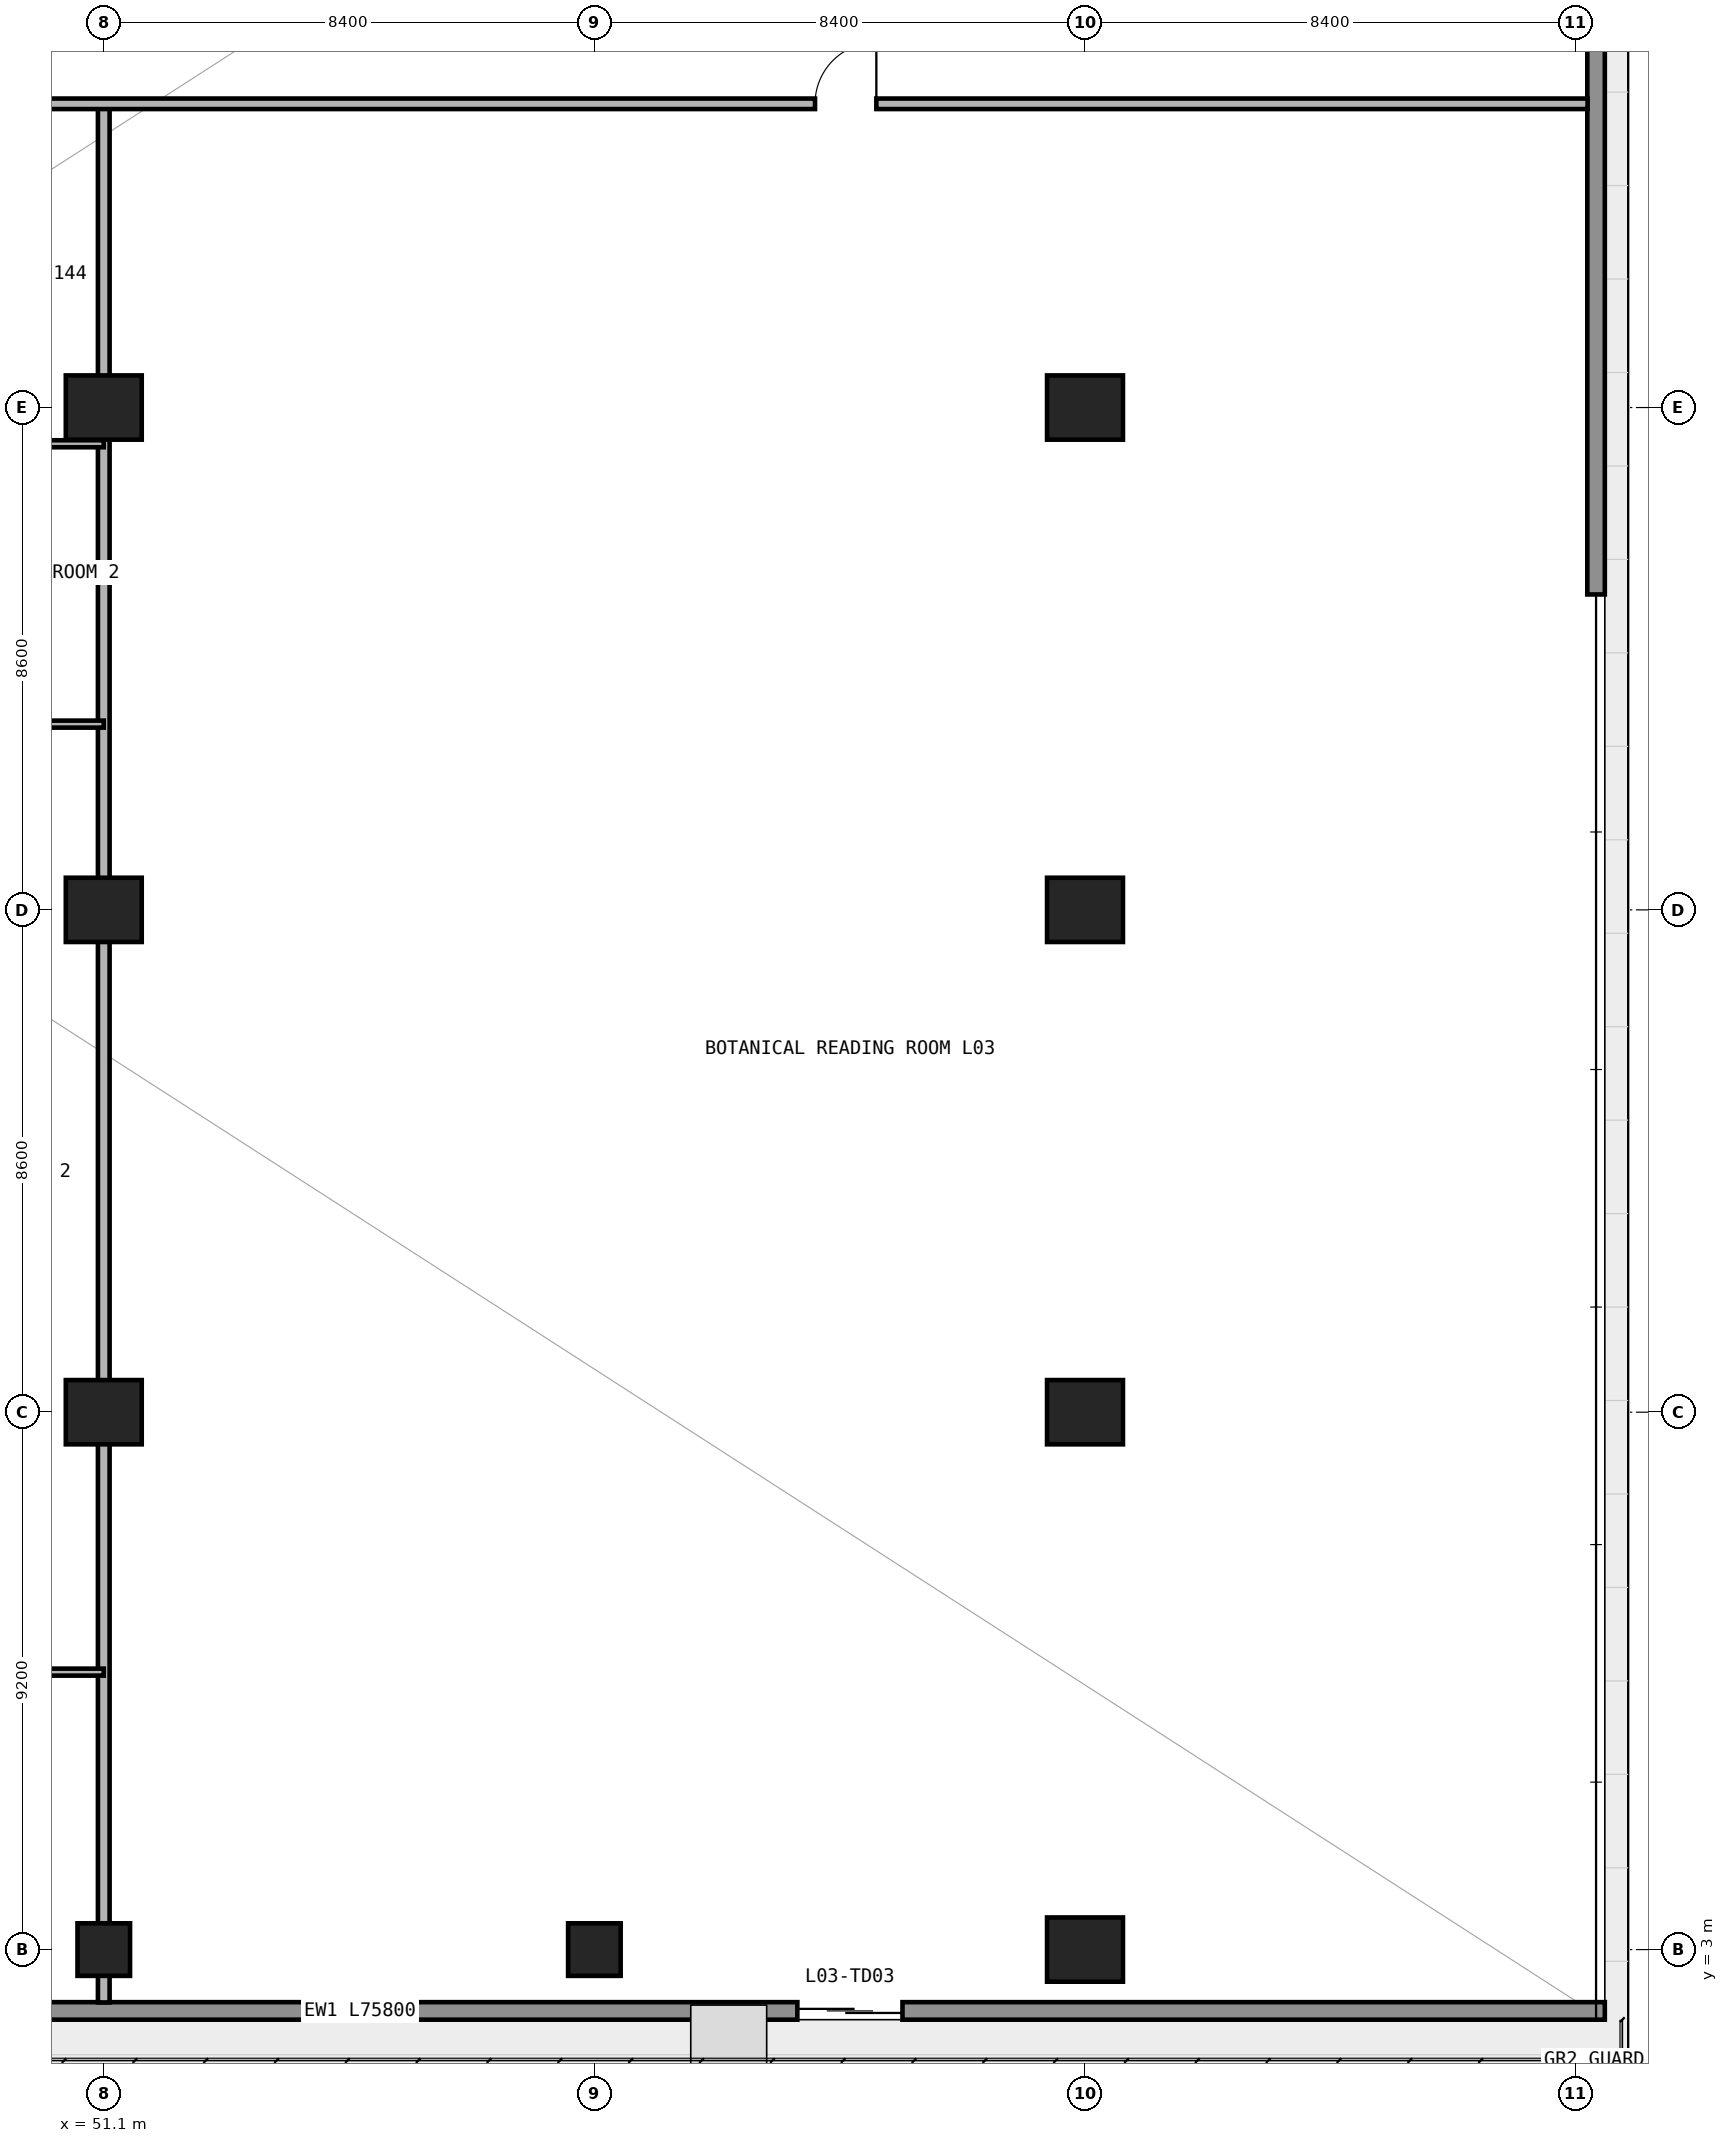
"""IFC4 building model, lengths in metres.
Left out: names, types, materials, properties, quantities, classifications, styles, units other than length and angle.
Written with IfcOpenShell. Run it as: python <this file> out.ifc"""

import sys

from ifc_helpers import new_model, si_unit, direction, frame, frame_2d, origin, origin_2d, place, context, subcontext, project, spatial, rectangle, circle, extrude, element, fill, save


model = new_model("IFC4")
c1 = context("Model", 3, precision=1e-05, world=origin(), true_north=direction((0.0, 1.0)))
c2 = subcontext(c1, "Body", "Model", "MODEL_VIEW")
j1 = project(units=[si_unit("LENGTHUNIT", "METRE"), si_unit("PLANEANGLEUNIT", "RADIAN")], contexts=[c1])
p1 = place(None, origin())
s1 = spatial("IfcSite", under=j1, at=p1, CompositionType="ELEMENT")
p2 = place(p1, origin())
s2 = spatial("IfcBuilding", under=s1, at=p2, CompositionType="ELEMENT")
p3 = place(p2, frame((0.0, 0.0, 15.0)))
s3 = spatial("IfcBuildingStorey", under=s2, at=p3, CompositionType="ELEMENT", Elevation=15.0)
for number, where, z_axis, x_axis in (
    (1, (51.1, 3.0, 0.0), (0.0, 0.0, 1.0), (1.0, 0.0, 0.0)),
    (2, (59.5, 3.0, 0.0), (0.0, 0.0, 1.0), (1.0, 0.0, 0.0)),
):
    element("IfcColumn", number, at=place(p3, frame(where, z_axis=z_axis, x_axis=x_axis)), inside=s3, PredefinedType="COLUMN", context=c2, shape_type="SweptSolid", body=[
        extrude(circle(Radius=0.45, at=origin_2d()), origin(), (0.0, 0.0, 1.0), 4.5),
    ])
for number, where, z_axis, x_axis in (
    (3, (67.9, 3.0, 0.0), (0.0, 0.0, 1.0), (1.0, 0.0, 0.0)),
    (4, (51.1, 12.2, 0.0), (0.0, 0.0, 1.0), (1.0, 0.0, 0.0)),
    (5, (67.9, 12.2, 0.0), (0.0, 0.0, 1.0), (1.0, 0.0, 0.0)),
    (6, (51.1, 20.8, 0.0), (0.0, 0.0, 1.0), (1.0, 0.0, 0.0)),
    (7, (67.9, 20.8, 0.0), (0.0, 0.0, 1.0), (1.0, 0.0, 0.0)),
    (8, (51.1, 29.4, 0.0), (0.0, 0.0, 1.0), (1.0, 0.0, 0.0)),
    (9, (67.9, 29.4, 0.0), (0.0, 0.0, 1.0), (1.0, 0.0, 0.0)),
):
    element("IfcColumn", number, at=place(p3, frame(where, z_axis=z_axis, x_axis=x_axis)), inside=s3, PredefinedType="COLUMN", context=c2, shape_type="SweptSolid", body=[
        extrude(rectangle(XDim=1.3, YDim=1.1, at=origin_2d()), origin(), (0.0, 0.0, 1.0), 4.5),
    ])
p4 = place(p3, frame((76.8, 1.95, 0.0), z_axis=(0.0, 0.0, 1.0), x_axis=(-1.0, 0.0, 0.0)))
e10 = element("IfcWall", 10, at=p4, inside=s3, PredefinedType="STANDARD", context=c2, shape_type="SweptSolid", body=[
    extrude(rectangle(XDim=75.8, YDim=0.3, at=frame_2d((37.9, 0.0))), origin(), (0.0, 0.0, 1.0), 4.5),
])
p5 = place(p4, frame((69.775, 0.0, 0.85)))
e11 = element("IfcOpeningElement", 11, at=p5, cuts=e10, PredefinedType="OPENING", context=c2, shape_type="SweptSolid", body=[
    extrude(rectangle(XDim=3.0, YDim=2.4, at=frame_2d((1.5, 1.2))), frame((0.0, 0.16, 0.0), z_axis=(0.0, -1.0, 0.0), x_axis=(1.0, 0.0, 0.0)), (0.0, 0.0, 1.0), 0.32),
])
p6 = place(p4, frame((61.8, 0.0, 0.0)))
e12 = element("IfcOpeningElement", 12, at=p6, cuts=e10, PredefinedType="OPENING", context=c2, shape_type="SweptSolid", body=[
    extrude(rectangle(XDim=1.8, YDim=2.3, at=frame_2d((0.9, 1.15))), frame((0.0, 0.16, 0.0), z_axis=(0.0, -1.0, 0.0), x_axis=(1.0, 0.0, 0.0)), (0.0, 0.0, 1.0), 0.32),
])
p7 = place(p4, frame((53.2, 0.0, 0.85)))
e13 = element("IfcOpeningElement", 13, at=p7, cuts=e10, PredefinedType="OPENING", context=c2, shape_type="SweptSolid", body=[
    extrude(rectangle(XDim=2.2, YDim=1.55, at=frame_2d((1.1, 0.775))), frame((0.0, 0.16, 0.0), z_axis=(0.0, -1.0, 0.0), x_axis=(1.0, 0.0, 0.0)), (0.0, 0.0, 1.0), 0.32),
])
p8 = place(p4, frame((45.0, 0.0, 0.0)))
e14 = element("IfcOpeningElement", 14, at=p8, cuts=e10, PredefinedType="OPENING", context=c2, shape_type="SweptSolid", body=[
    extrude(rectangle(XDim=1.8, YDim=2.3, at=frame_2d((0.9, 1.15))), frame((0.0, 0.16, 0.0), z_axis=(0.0, -1.0, 0.0), x_axis=(1.0, 0.0, 0.0)), (0.0, 0.0, 1.0), 0.32),
])
p9 = place(p4, frame((36.8, 0.0, 0.85)))
e15 = element("IfcOpeningElement", 15, at=p9, cuts=e10, PredefinedType="OPENING", context=c2, shape_type="SweptSolid", body=[
    extrude(rectangle(XDim=2.2, YDim=1.55, at=frame_2d((1.1, 0.775))), frame((0.0, 0.16, 0.0), z_axis=(0.0, -1.0, 0.0), x_axis=(1.0, 0.0, 0.0)), (0.0, 0.0, 1.0), 0.32),
])
p10 = place(p4, frame((28.8, 0.0, 0.85)))
e16 = element("IfcOpeningElement", 16, at=p10, cuts=e10, PredefinedType="OPENING", context=c2, shape_type="SweptSolid", body=[
    extrude(rectangle(XDim=2.2, YDim=1.55, at=frame_2d((1.1, 0.775))), frame((0.0, 0.16, 0.0), z_axis=(0.0, -1.0, 0.0), x_axis=(1.0, 0.0, 0.0)), (0.0, 0.0, 1.0), 0.32),
])
p11 = place(p4, frame((12.025, 0.0, 0.0)))
e17 = element("IfcOpeningElement", 17, at=p11, cuts=e10, PredefinedType="OPENING", context=c2, shape_type="SweptSolid", body=[
    extrude(rectangle(XDim=1.8, YDim=2.3, at=frame_2d((0.9, 1.15))), frame((0.0, 0.16, 0.0), z_axis=(0.0, -1.0, 0.0), x_axis=(1.0, 0.0, 0.0)), (0.0, 0.0, 1.0), 0.32),
])
p12 = place(p3, frame((76.65, 50.6, 0.0), z_axis=(0.0, 0.0, 1.0), x_axis=(0.0, -1.0, 0.0)))
e18 = element("IfcWall", 18, at=p12, inside=s3, PredefinedType="STANDARD", context=c2, shape_type="SweptSolid", body=[
    extrude(rectangle(XDim=24.4, YDim=0.3, at=frame_2d((12.2, 0.0))), origin(), (0.0, 0.0, 1.0), 4.5),
])
p13 = place(p3, frame((51.1, 2.095, 0.0), z_axis=(0.0, 0.0, 1.0), x_axis=(0.0, 1.0, 0.0)))
e19 = element("IfcWall", 19, at=p13, inside=s3, PredefinedType="PARTITIONING", context=c2, shape_type="SweptSolid", body=[
    extrude(rectangle(XDim=32.505, YDim=0.2, at=frame_2d((16.252, 0.0))), origin(), (0.0, 0.0, 1.0), 3.464),
])
p14 = place(p3, frame((35.1, 7.75, 0.0), z_axis=(0.0, 0.0, 1.0), x_axis=(1.0, 0.0, 0.0)))
e20 = element("IfcWall", 20, at=p14, inside=s3, PredefinedType="PARTITIONING", context=c2, shape_type="SweptSolid", body=[
    extrude(rectangle(XDim=16.0, YDim=0.12, at=frame_2d((8.0, 0.0))), origin(), (0.0, 0.0, 1.0), 4.5),
])
p15 = place(p14, frame((3.35, 0.0, 0.0)))
e21 = element("IfcOpeningElement", 21, at=p15, cuts=e20, PredefinedType="OPENING", context=c2, shape_type="SweptSolid", body=[
    extrude(rectangle(XDim=0.9, YDim=2.15, at=frame_2d((0.45, 1.075))), frame((0.0, 0.07, 0.0), z_axis=(0.0, -1.0, 0.0), x_axis=(1.0, 0.0, 0.0)), (0.0, 0.0, 1.0), 0.14),
])
p16 = place(p14, frame((11.35, 0.0, 0.0)))
e22 = element("IfcOpeningElement", 22, at=p16, cuts=e20, PredefinedType="OPENING", context=c2, shape_type="SweptSolid", body=[
    extrude(rectangle(XDim=0.9, YDim=2.15, at=frame_2d((0.45, 1.075))), frame((0.0, 0.07, 0.0), z_axis=(0.0, -1.0, 0.0), x_axis=(1.0, 0.0, 0.0)), (0.0, 0.0, 1.0), 0.14),
])
p17 = place(p3, frame((42.7, 23.98, 0.0), z_axis=(0.0, 0.0, 1.0), x_axis=(1.0, 0.0, 0.0)))
e23 = element("IfcWall", 23, at=p17, inside=s3, PredefinedType="PARTITIONING", context=c2, shape_type="SweptSolid", body=[
    extrude(rectangle(XDim=8.4, YDim=0.12, at=frame_2d((4.2, 0.0))), origin(), (0.0, 0.0, 1.0), 4.5),
])
p18 = place(p17, frame((3.75, 0.0, 0.0)))
e24 = element("IfcOpeningElement", 24, at=p18, cuts=e23, PredefinedType="OPENING", context=c2, shape_type="SweptSolid", body=[
    extrude(rectangle(XDim=0.9, YDim=2.15, at=frame_2d((0.45, 1.075))), frame((0.0, 0.07, 0.0), z_axis=(0.0, -1.0, 0.0), x_axis=(1.0, 0.0, 0.0)), (0.0, 0.0, 1.0), 0.14),
])
p19 = place(p3, frame((42.7, 28.78, 0.0), z_axis=(0.0, 0.0, 1.0), x_axis=(1.0, 0.0, 0.0)))
e25 = element("IfcWall", 25, at=p19, inside=s3, PredefinedType="PARTITIONING", context=c2, shape_type="SweptSolid", body=[
    extrude(rectangle(XDim=8.4, YDim=0.12, at=frame_2d((4.2, 0.0))), origin(), (0.0, 0.0, 1.0), 4.5),
])
p20 = place(p19, frame((2.926, 0.0, 0.0)))
e26 = element("IfcOpeningElement", 26, at=p20, cuts=e25, PredefinedType="OPENING", context=c2, shape_type="SweptSolid", body=[
    extrude(rectangle(XDim=0.9, YDim=2.15, at=frame_2d((0.45, 1.075))), frame((0.0, 0.07, 0.0), z_axis=(0.0, -1.0, 0.0), x_axis=(1.0, 0.0, 0.0)), (0.0, 0.0, 1.0), 0.14),
])
p21 = place(p3, frame((1.295, 34.6, 0.0), z_axis=(0.0, 0.0, 1.0), x_axis=(1.0, 0.0, 0.0)))
e27 = element("IfcWall", 27, at=p21, inside=s3, PredefinedType="PARTITIONING", context=c2, shape_type="SweptSolid", body=[
    extrude(rectangle(XDim=75.21, YDim=0.18, at=frame_2d((37.605, 0.0))), origin(), (0.0, 0.0, 1.0), 4.5),
])
p22 = place(p21, frame((3.778, 0.0, 0.0)))
e28 = element("IfcOpeningElement", 28, at=p22, cuts=e27, PredefinedType="OPENING", context=c2, shape_type="SweptSolid", body=[
    extrude(rectangle(XDim=1.05, YDim=2.15, at=frame_2d((0.525, 1.075))), frame((0.0, 0.1, 0.0), z_axis=(0.0, -1.0, 0.0), x_axis=(1.0, 0.0, 0.0)), (0.0, 0.0, 1.0), 0.2),
])
p23 = place(p21, frame((11.555, 0.0, 0.0)))
e29 = element("IfcOpeningElement", 29, at=p23, cuts=e27, PredefinedType="OPENING", context=c2, shape_type="SweptSolid", body=[
    extrude(rectangle(XDim=1.0, YDim=2.2, at=frame_2d((0.5, 1.1))), frame((0.0, 0.1, 0.0), z_axis=(0.0, -1.0, 0.0), x_axis=(1.0, 0.0, 0.0)), (0.0, 0.0, 1.0), 0.2),
])
p24 = place(p21, frame((28.263, 0.0, 0.0)))
e30 = element("IfcOpeningElement", 30, at=p24, cuts=e27, PredefinedType="OPENING", context=c2, shape_type="SweptSolid", body=[
    extrude(rectangle(XDim=1.0, YDim=2.2, at=frame_2d((0.5, 1.1))), frame((0.0, 0.1, 0.0), z_axis=(0.0, -1.0, 0.0), x_axis=(1.0, 0.0, 0.0)), (0.0, 0.0, 1.0), 0.2),
])
p25 = place(p21, frame((61.982, 0.0, 0.0)))
e31 = element("IfcOpeningElement", 31, at=p25, cuts=e27, PredefinedType="OPENING", context=c2, shape_type="SweptSolid", body=[
    extrude(rectangle(XDim=1.05, YDim=2.15, at=frame_2d((0.525, 1.075))), frame((0.0, 0.1, 0.0), z_axis=(0.0, -1.0, 0.0), x_axis=(1.0, 0.0, 0.0)), (0.0, 0.0, 1.0), 0.2),
])
p26 = place(p11, origin())
e32 = element("IfcDoor", 32, at=p26, inside=s3, OperationType="DOUBLE_DOOR_SLIDING", PredefinedType="DOOR", context=c2, shape_type="SweptSolid", body=[
    extrude(rectangle(XDim=1.8, YDim=2.3, at=frame_2d((0.9, 1.15))), frame((0.0, 0.025, 0.0), z_axis=(0.0, -1.0, 0.0), x_axis=(1.0, 0.0, 0.0)), (0.0, 0.0, 1.0), 0.05),
])
fill(e17, e32)
p27 = place(p25, origin())
e33 = element("IfcDoor", 33, at=p27, inside=s3, OperationType="SINGLE_SWING_RIGHT", PredefinedType="DOOR", context=c2, shape_type="SweptSolid", body=[
    extrude(rectangle(XDim=1.05, YDim=2.15, at=frame_2d((0.525, 1.075))), frame((0.0, 0.025, 0.0), z_axis=(0.0, -1.0, 0.0), x_axis=(1.0, 0.0, 0.0)), (0.0, 0.0, 1.0), 0.05),
])
fill(e31, e33)
save(model, sys.argv[1])
